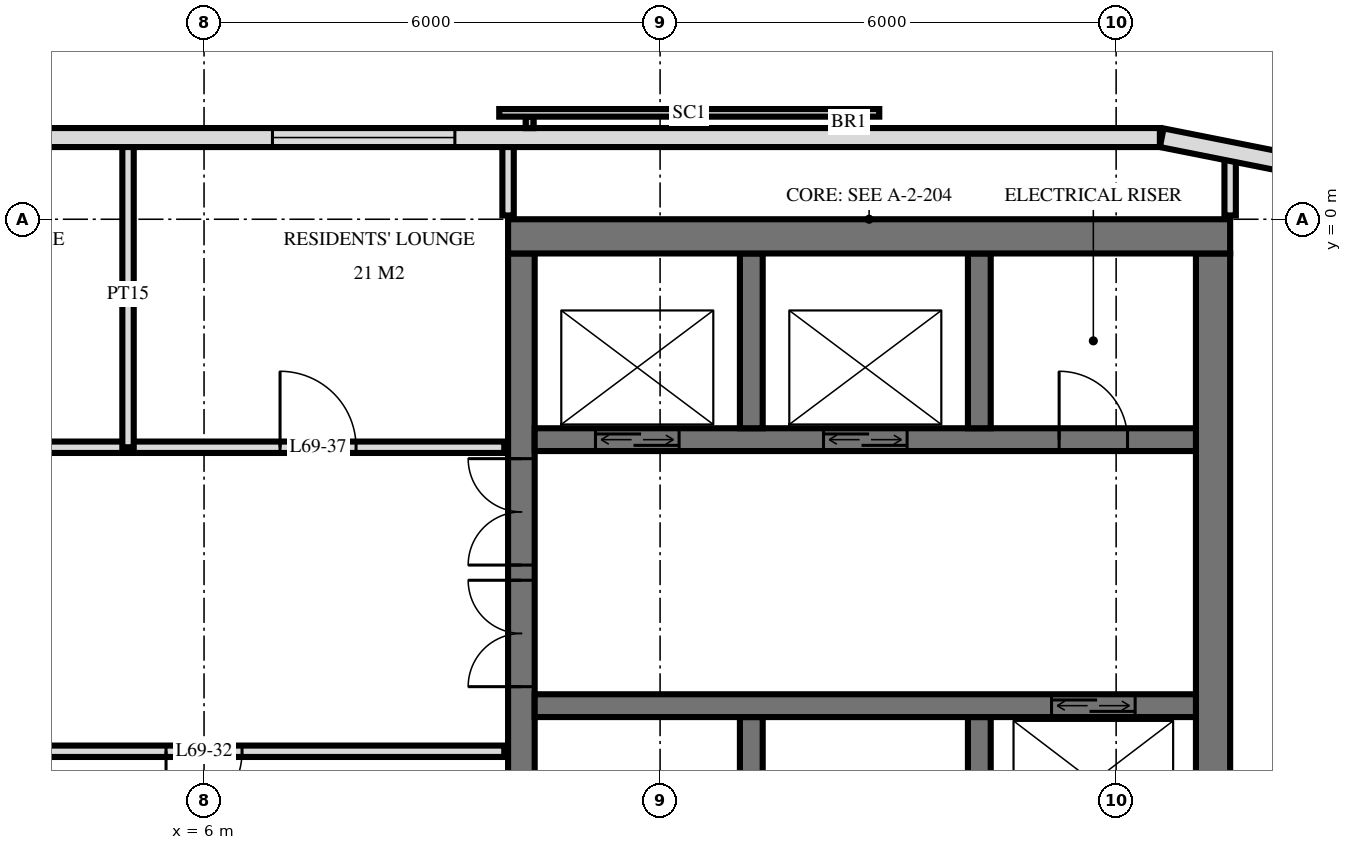
"""IFC4 building model, lengths in metres.
Left out: names, types, materials, properties, quantities, classifications, styles, units other than length and angle.
Written with IfcOpenShell. Run it as: python <this file> out.ifc"""

import sys

from ifc_helpers import new_model, si_unit, direction, frame, frame_2d, origin, place, context, subcontext, project, spatial, rectangle, extrude, element, fill, save


model = new_model("IFC4")
c1 = context("Model", 3, precision=1e-05, world=origin(), true_north=direction((0.0, 1.0)))
c2 = subcontext(c1, "Body", "Model", "MODEL_VIEW")
j1 = project(units=[si_unit("LENGTHUNIT", "METRE"), si_unit("PLANEANGLEUNIT", "RADIAN")], contexts=[c1])
p1 = place(None, origin())
s1 = spatial("IfcSite", under=j1, at=p1, CompositionType="ELEMENT")
p2 = place(p1, origin())
s2 = spatial("IfcBuilding", under=s1, at=p2, CompositionType="ELEMENT")
p3 = place(p2, frame((0.0, 0.0, 263.1)))
s3 = spatial("IfcBuildingStorey", under=s2, at=p3, CompositionType="ELEMENT", Elevation=263.1)
p4 = place(p3, frame((10.0, -0.225, 0.0), z_axis=(0.0, 0.0, 1.0), x_axis=(1.0, 0.0, 0.0)))
e1 = element("IfcWall", 1, at=p4, inside=s3, PredefinedType="SHEAR", context=c2, shape_type="SweptSolid", body=[
    extrude(rectangle(XDim=9.5, YDim=0.45, at=frame_2d((4.75, 0.0))), origin(), (0.0, 0.0, 1.0), 3.5),
])
p5 = place(p3, frame((10.175, -14.55, 0.0), z_axis=(0.0, 0.0, 1.0), x_axis=(0.0, 1.0, 0.0)))
e2 = element("IfcWall", 2, at=p5, inside=s3, PredefinedType="SHEAR", context=c2, shape_type="SweptSolid", body=[
    extrude(rectangle(XDim=14.1, YDim=0.35, at=frame_2d((7.05, 0.0))), origin(), (0.0, 0.0, 1.0), 3.5),
])
p6 = place(p5, frame((8.4, 0.0, 0.0)))
e3 = element("IfcOpeningElement", 3, at=p6, cuts=e2, PredefinedType="OPENING", context=c2, shape_type="SweptSolid", body=[
    extrude(rectangle(XDim=1.4, YDim=2.4, at=frame_2d((0.7, 1.2))), frame((0.0, 0.185, 0.0), z_axis=(0.0, -1.0, 0.0), x_axis=(1.0, 0.0, 0.0)), (0.0, 0.0, 1.0), 0.37),
])
p7 = place(p5, frame((10.0, 0.0, 0.0)))
e4 = element("IfcOpeningElement", 4, at=p7, cuts=e2, PredefinedType="OPENING", context=c2, shape_type="SweptSolid", body=[
    extrude(rectangle(XDim=1.4, YDim=2.4, at=frame_2d((0.7, 1.2))), frame((0.0, 0.185, 0.0), z_axis=(0.0, -1.0, 0.0), x_axis=(1.0, 0.0, 0.0)), (0.0, 0.0, 1.0), 0.37),
])
p8 = place(p5, frame((4.0, 0.0, 0.0)))
e5 = element("IfcOpeningElement", 5, at=p8, cuts=e2, PredefinedType="OPENING", context=c2, shape_type="SweptSolid", body=[
    extrude(rectangle(XDim=1.2, YDim=2.1, at=frame_2d((0.6, 1.05))), frame((0.0, 0.185, 0.0), z_axis=(0.0, -1.0, 0.0), x_axis=(1.0, 0.0, 0.0)), (0.0, 0.0, 1.0), 0.37),
])
p9 = place(p3, frame((19.275, -14.55, 0.0), z_axis=(0.0, 0.0, 1.0), x_axis=(0.0, 1.0, 0.0)))
e6 = element("IfcWall", 6, at=p9, inside=s3, PredefinedType="SHEAR", context=c2, shape_type="SweptSolid", body=[
    extrude(rectangle(XDim=14.1, YDim=0.45, at=frame_2d((7.05, 0.0))), origin(), (0.0, 0.0, 1.0), 3.5),
])
p10 = place(p3, frame((10.35, -2.9, 0.0), z_axis=(0.0, 0.0, 1.0), x_axis=(1.0, 0.0, 0.0)))
e7 = element("IfcWall", 7, at=p10, inside=s3, PredefinedType="SHEAR", context=c2, shape_type="SweptSolid", body=[
    extrude(rectangle(XDim=8.7, YDim=0.3, at=frame_2d((4.35, 0.0))), origin(), (0.0, 0.0, 1.0), 3.5),
])
p11 = place(p10, frame((0.8, 0.0, 0.0)))
e8 = element("IfcOpeningElement", 8, at=p11, cuts=e7, PredefinedType="OPENING", context=c2, shape_type="SweptSolid", body=[
    extrude(rectangle(XDim=1.1, YDim=2.1, at=frame_2d((0.55, 1.05))), frame((0.0, 0.16, 0.0), z_axis=(0.0, -1.0, 0.0), x_axis=(1.0, 0.0, 0.0)), (0.0, 0.0, 1.0), 0.32),
])
p12 = place(p10, frame((3.8, 0.0, 0.0)))
e9 = element("IfcOpeningElement", 9, at=p12, cuts=e7, PredefinedType="OPENING", context=c2, shape_type="SweptSolid", body=[
    extrude(rectangle(XDim=1.1, YDim=2.1, at=frame_2d((0.55, 1.05))), frame((0.0, 0.16, 0.0), z_axis=(0.0, -1.0, 0.0), x_axis=(1.0, 0.0, 0.0)), (0.0, 0.0, 1.0), 0.32),
])
p13 = place(p10, frame((6.9, 0.0, 0.0)))
e10 = element("IfcOpeningElement", 10, at=p13, cuts=e7, PredefinedType="OPENING", context=c2, shape_type="SweptSolid", body=[
    extrude(rectangle(XDim=0.9, YDim=2.1, at=frame_2d((0.45, 1.05))), frame((0.0, 0.16, 0.0), z_axis=(0.0, -1.0, 0.0), x_axis=(1.0, 0.0, 0.0)), (0.0, 0.0, 1.0), 0.32),
])
p14 = place(p3, frame((10.35, -6.4, 0.0), z_axis=(0.0, 0.0, 1.0), x_axis=(1.0, 0.0, 0.0)))
e11 = element("IfcWall", 11, at=p14, inside=s3, PredefinedType="SHEAR", context=c2, shape_type="SweptSolid", body=[
    extrude(rectangle(XDim=8.7, YDim=0.3, at=frame_2d((4.35, 0.0))), origin(), (0.0, 0.0, 1.0), 3.5),
])
p15 = place(p14, frame((6.8, 0.0, 0.0)))
e12 = element("IfcOpeningElement", 12, at=p15, cuts=e11, PredefinedType="OPENING", context=c2, shape_type="SweptSolid", body=[
    extrude(rectangle(XDim=1.1, YDim=2.1, at=frame_2d((0.55, 1.05))), frame((0.0, 0.16, 0.0), z_axis=(0.0, -1.0, 0.0), x_axis=(1.0, 0.0, 0.0)), (0.0, 0.0, 1.0), 0.32),
])
for number, where, z_axis, x_axis in (
    (13, (13.2, -2.75, 0.0), (0.0, 0.0, 1.0), (0.0, 1.0, 0.0)),
    (14, (13.2, -8.85, 0.0), (0.0, 0.0, 1.0), (0.0, 1.0, 0.0)),
    (15, (16.2, -2.75, 0.0), (0.0, 0.0, 1.0), (0.0, 1.0, 0.0)),
    (16, (16.2, -8.85, 0.0), (0.0, 0.0, 1.0), (0.0, 1.0, 0.0)),
):
    element("IfcWall", number, at=place(p3, frame(where, z_axis=z_axis, x_axis=x_axis)), inside=s3, PredefinedType="SHEAR", context=c2, shape_type="SweptSolid", body=[
        extrude(rectangle(XDim=2.3, YDim=0.3, at=frame_2d((1.15, 0.0))), origin(), (0.0, 0.0, 1.0), 3.5),
    ])
p16 = place(p3, frame((20.249, 0.745, 0.0), z_axis=(0.0, 0.0, 1.0), x_axis=(-0.980797896849, 0.195026884138, 0.0)))
e17 = element("IfcWall", 17, at=p16, inside=s3, PredefinedType="SOLIDWALL", context=c2, shape_type="SweptSolid", body=[
    extrude(rectangle(XDim=1.681, YDim=0.25, at=frame_2d((0.841, 0.0))), origin(), (0.0, 0.0, 1.0), 3.22),
])
p17 = place(p3, frame((18.575, 1.075, 0.0), z_axis=(0.0, 0.0, 1.0), x_axis=(-1.0, 0.0, 0.0)))
e18 = element("IfcWall", 18, at=p17, inside=s3, PredefinedType="SOLIDWALL", context=c2, shape_type="SweptSolid", body=[
    extrude(rectangle(XDim=37.151, YDim=0.25, at=frame_2d((18.575, 0.0))), origin(), (0.0, 0.0, 1.0), 3.22),
])
p18 = place(p17, frame((9.275, 0.0, 0.9)))
e19 = element("IfcOpeningElement", 19, at=p18, cuts=e18, PredefinedType="OPENING", context=c2, shape_type="SweptSolid", body=[
    extrude(rectangle(XDim=2.4, YDim=1.5, at=frame_2d((1.2, 0.75))), frame((0.0, 0.135, 0.0), z_axis=(0.0, -1.0, 0.0), x_axis=(1.0, 0.0, 0.0)), (0.0, 0.0, 1.0), 0.27),
])
p19 = place(p17, frame((15.275, 0.0, 0.9)))
e20 = element("IfcOpeningElement", 20, at=p19, cuts=e18, PredefinedType="OPENING", context=c2, shape_type="SweptSolid", body=[
    extrude(rectangle(XDim=2.4, YDim=1.5, at=frame_2d((1.2, 0.75))), frame((0.0, 0.135, 0.0), z_axis=(0.0, -1.0, 0.0), x_axis=(1.0, 0.0, 0.0)), (0.0, 0.0, 1.0), 0.27),
])
p20 = place(p17, frame((25.125, 0.0, 0.9)))
e21 = element("IfcOpeningElement", 21, at=p20, cuts=e18, PredefinedType="OPENING", context=c2, shape_type="SweptSolid", body=[
    extrude(rectangle(XDim=2.4, YDim=1.5, at=frame_2d((1.2, 0.75))), frame((0.0, 0.135, 0.0), z_axis=(0.0, -1.0, 0.0), x_axis=(1.0, 0.0, 0.0)), (0.0, 0.0, 1.0), 0.27),
])
p21 = place(p3, frame((19.5, 0.05, 0.0), z_axis=(0.0, 0.0, 1.0), x_axis=(0.0, 1.0, 0.0)))
e22 = element("IfcWall", 22, at=p21, inside=s3, PredefinedType="PARTITIONING", context=c2, shape_type="SweptSolid", body=[
    extrude(rectangle(XDim=0.787, YDim=0.15, at=frame_2d((0.394, 0.0))), origin(), (0.0, 0.0, 1.0), 3.22),
])
p22 = place(p3, frame((10.0, 0.05, 0.0), z_axis=(0.0, 0.0, 1.0), x_axis=(0.0, 1.0, 0.0)))
e23 = element("IfcWall", 23, at=p22, inside=s3, PredefinedType="PARTITIONING", context=c2, shape_type="SweptSolid", body=[
    extrude(rectangle(XDim=0.97, YDim=0.15, at=frame_2d((0.485, 0.0))), origin(), (0.0, 0.0, 1.0), 3.22),
])
p23 = place(p3, frame((5.0, -3.0, 0.0), z_axis=(0.0, 0.0, 1.0), x_axis=(0.0, 1.0, 0.0)))
e24 = element("IfcWall", 24, at=p23, inside=s3, PredefinedType="PARTITIONING", context=c2, shape_type="SweptSolid", body=[
    extrude(rectangle(XDim=4.02, YDim=0.15, at=frame_2d((2.01, 0.0))), origin(), (0.0, 0.0, 1.0), 3.22),
])
p24 = place(p3, frame((-9.95, -7.0, 0.0), z_axis=(0.0, 0.0, 1.0), x_axis=(1.0, 0.0, 0.0)))
e25 = element("IfcWall", 25, at=p24, inside=s3, PredefinedType="PARTITIONING", context=c2, shape_type="SweptSolid", body=[
    extrude(rectangle(XDim=19.9, YDim=0.15, at=frame_2d((9.95, 0.0))), origin(), (0.0, 0.0, 1.0), 3.22),
])
p25 = place(p24, frame((9.45, 0.0, 0.0)))
e26 = element("IfcOpeningElement", 26, at=p25, cuts=e25, PredefinedType="OPENING", context=c2, shape_type="SweptSolid", body=[
    extrude(rectangle(XDim=1.0, YDim=2.1, at=frame_2d((0.5, 1.05))), frame((0.0, 0.085, 0.0), z_axis=(0.0, -1.0, 0.0), x_axis=(1.0, 0.0, 0.0)), (0.0, 0.0, 1.0), 0.17),
])
p26 = place(p24, frame((15.45, 0.0, 0.0)))
e27 = element("IfcOpeningElement", 27, at=p26, cuts=e25, PredefinedType="OPENING", context=c2, shape_type="SweptSolid", body=[
    extrude(rectangle(XDim=1.0, YDim=2.1, at=frame_2d((0.5, 1.05))), frame((0.0, 0.085, 0.0), z_axis=(0.0, -1.0, 0.0), x_axis=(1.0, 0.0, 0.0)), (0.0, 0.0, 1.0), 0.17),
])
p27 = place(p3, frame((-9.95, -3.0, 0.0), z_axis=(0.0, 0.0, 1.0), x_axis=(1.0, 0.0, 0.0)))
e28 = element("IfcWall", 28, at=p27, inside=s3, PredefinedType="PARTITIONING", context=c2, shape_type="SweptSolid", body=[
    extrude(rectangle(XDim=19.9, YDim=0.15, at=frame_2d((9.95, 0.0))), origin(), (0.0, 0.0, 1.0), 3.22),
])
p28 = place(p27, frame((1.7, 0.0, 0.0)))
e29 = element("IfcOpeningElement", 29, at=p28, cuts=e28, PredefinedType="OPENING", context=c2, shape_type="SweptSolid", body=[
    extrude(rectangle(XDim=1.0, YDim=2.1, at=frame_2d((0.5, 1.05))), frame((0.0, 0.085, 0.0), z_axis=(0.0, -1.0, 0.0), x_axis=(1.0, 0.0, 0.0)), (0.0, 0.0, 1.0), 0.17),
])
p29 = place(p27, frame((5.45, 0.0, 0.0)))
e30 = element("IfcOpeningElement", 30, at=p29, cuts=e28, PredefinedType="OPENING", context=c2, shape_type="SweptSolid", body=[
    extrude(rectangle(XDim=1.0, YDim=2.1, at=frame_2d((0.5, 1.05))), frame((0.0, 0.085, 0.0), z_axis=(0.0, -1.0, 0.0), x_axis=(1.0, 0.0, 0.0)), (0.0, 0.0, 1.0), 0.17),
])
p30 = place(p27, frame((8.2, 0.0, 0.0)))
e31 = element("IfcOpeningElement", 31, at=p30, cuts=e28, PredefinedType="OPENING", context=c2, shape_type="SweptSolid", body=[
    extrude(rectangle(XDim=1.0, YDim=2.1, at=frame_2d((0.5, 1.05))), frame((0.0, 0.085, 0.0), z_axis=(0.0, -1.0, 0.0), x_axis=(1.0, 0.0, 0.0)), (0.0, 0.0, 1.0), 0.17),
])
p31 = place(p27, frame((11.95, 0.0, 0.0)))
e32 = element("IfcOpeningElement", 32, at=p31, cuts=e28, PredefinedType="OPENING", context=c2, shape_type="SweptSolid", body=[
    extrude(rectangle(XDim=1.0, YDim=2.1, at=frame_2d((0.5, 1.05))), frame((0.0, 0.085, 0.0), z_axis=(0.0, -1.0, 0.0), x_axis=(1.0, 0.0, 0.0)), (0.0, 0.0, 1.0), 0.17),
])
p32 = place(p27, frame((16.95, 0.0, 0.0)))
e33 = element("IfcOpeningElement", 33, at=p32, cuts=e28, PredefinedType="OPENING", context=c2, shape_type="SweptSolid", body=[
    extrude(rectangle(XDim=1.0, YDim=2.1, at=frame_2d((0.5, 1.05))), frame((0.0, 0.085, 0.0), z_axis=(0.0, -1.0, 0.0), x_axis=(1.0, 0.0, 0.0)), (0.0, 0.0, 1.0), 0.17),
])
p33 = place(p18, origin())
e34 = element("IfcWindow", 34, at=p33, inside=s3, PartitioningType="SINGLE_PANEL", PredefinedType="WINDOW", context=c2, shape_type="SweptSolid", body=[
    extrude(rectangle(XDim=2.4, YDim=1.5, at=frame_2d((1.2, 0.75))), frame((0.0, 0.03, 0.0), z_axis=(0.0, -1.0, 0.0), x_axis=(1.0, 0.0, 0.0)), (0.0, 0.0, 1.0), 0.06),
])
fill(e19, e34)
p34 = place(p11, origin())
e35 = element("IfcDoor", 35, at=p34, inside=s3, OperationType="DOUBLE_DOOR_SLIDING", PredefinedType="USERDEFINED", context=c2, shape_type="SweptSolid", body=[
    extrude(rectangle(XDim=1.1, YDim=2.1, at=frame_2d((0.55, 1.05))), frame((0.0, 0.025, 0.0), z_axis=(0.0, -1.0, 0.0), x_axis=(1.0, 0.0, 0.0)), (0.0, 0.0, 1.0), 0.05),
])
fill(e8, e35)
p35 = place(p12, origin())
e36 = element("IfcDoor", 36, at=p35, inside=s3, OperationType="DOUBLE_DOOR_SLIDING", PredefinedType="USERDEFINED", context=c2, shape_type="SweptSolid", body=[
    extrude(rectangle(XDim=1.1, YDim=2.1, at=frame_2d((0.55, 1.05))), frame((0.0, 0.025, 0.0), z_axis=(0.0, -1.0, 0.0), x_axis=(1.0, 0.0, 0.0)), (0.0, 0.0, 1.0), 0.05),
])
fill(e9, e36)
p36 = place(p15, origin())
e37 = element("IfcDoor", 37, at=p36, inside=s3, OperationType="DOUBLE_DOOR_SLIDING", PredefinedType="USERDEFINED", context=c2, shape_type="SweptSolid", body=[
    extrude(rectangle(XDim=1.1, YDim=2.1, at=frame_2d((0.55, 1.05))), frame((0.0, 0.025, 0.0), z_axis=(0.0, -1.0, 0.0), x_axis=(1.0, 0.0, 0.0)), (0.0, 0.0, 1.0), 0.05),
])
fill(e12, e37)
p37 = place(p6, origin())
e38 = element("IfcDoor", 38, at=p37, inside=s3, OperationType="DOUBLE_DOOR_SINGLE_SWING", PredefinedType="DOOR", context=c2, shape_type="SweptSolid", body=[
    extrude(rectangle(XDim=1.4, YDim=2.4, at=frame_2d((0.7, 1.2))), frame((0.0, 0.025, 0.0), z_axis=(0.0, -1.0, 0.0), x_axis=(1.0, 0.0, 0.0)), (0.0, 0.0, 1.0), 0.05),
])
fill(e3, e38)
p38 = place(p7, origin())
e39 = element("IfcDoor", 39, at=p38, inside=s3, OperationType="DOUBLE_DOOR_SINGLE_SWING", PredefinedType="DOOR", context=c2, shape_type="SweptSolid", body=[
    extrude(rectangle(XDim=1.4, YDim=2.4, at=frame_2d((0.7, 1.2))), frame((0.0, 0.025, 0.0), z_axis=(0.0, -1.0, 0.0), x_axis=(1.0, 0.0, 0.0)), (0.0, 0.0, 1.0), 0.05),
])
fill(e4, e39)
p39 = place(p13, origin())
e40 = element("IfcDoor", 40, at=p39, inside=s3, OperationType="SINGLE_SWING_RIGHT", PredefinedType="DOOR", context=c2, shape_type="SweptSolid", body=[
    extrude(rectangle(XDim=0.9, YDim=2.1, at=frame_2d((0.45, 1.05))), frame((0.0, 0.025, 0.0), z_axis=(0.0, -1.0, 0.0), x_axis=(1.0, 0.0, 0.0)), (0.0, 0.0, 1.0), 0.05),
])
fill(e10, e40)
p40 = place(p26, frame((0.5, 0.0, 0.0), z_axis=(0.0, 0.0, 1.0), x_axis=(-1.0, 0.0, 0.0)))
e41 = element("IfcDoor", 41, at=p40, inside=s3, OperationType="SINGLE_SWING_LEFT", PredefinedType="DOOR", context=c2, shape_type="SweptSolid", body=[
    extrude(rectangle(XDim=1.0, YDim=2.1, at=frame_2d((0.0, 1.05))), frame((0.0, -0.025, 0.0), z_axis=(0.0, 1.0, 0.0), x_axis=(-1.0, 0.0, 0.0)), (0.0, 0.0, 1.0), 0.05),
])
fill(e27, e41)
p41 = place(p32, origin())
e42 = element("IfcDoor", 42, at=p41, inside=s3, OperationType="SINGLE_SWING_RIGHT", PredefinedType="DOOR", context=c2, shape_type="SweptSolid", body=[
    extrude(rectangle(XDim=1.0, YDim=2.1, at=frame_2d((0.5, 1.05))), frame((0.0, 0.025, 0.0), z_axis=(0.0, -1.0, 0.0), x_axis=(1.0, 0.0, 0.0)), (0.0, 0.0, 1.0), 0.05),
])
fill(e33, e42)
save(model, sys.argv[1])
